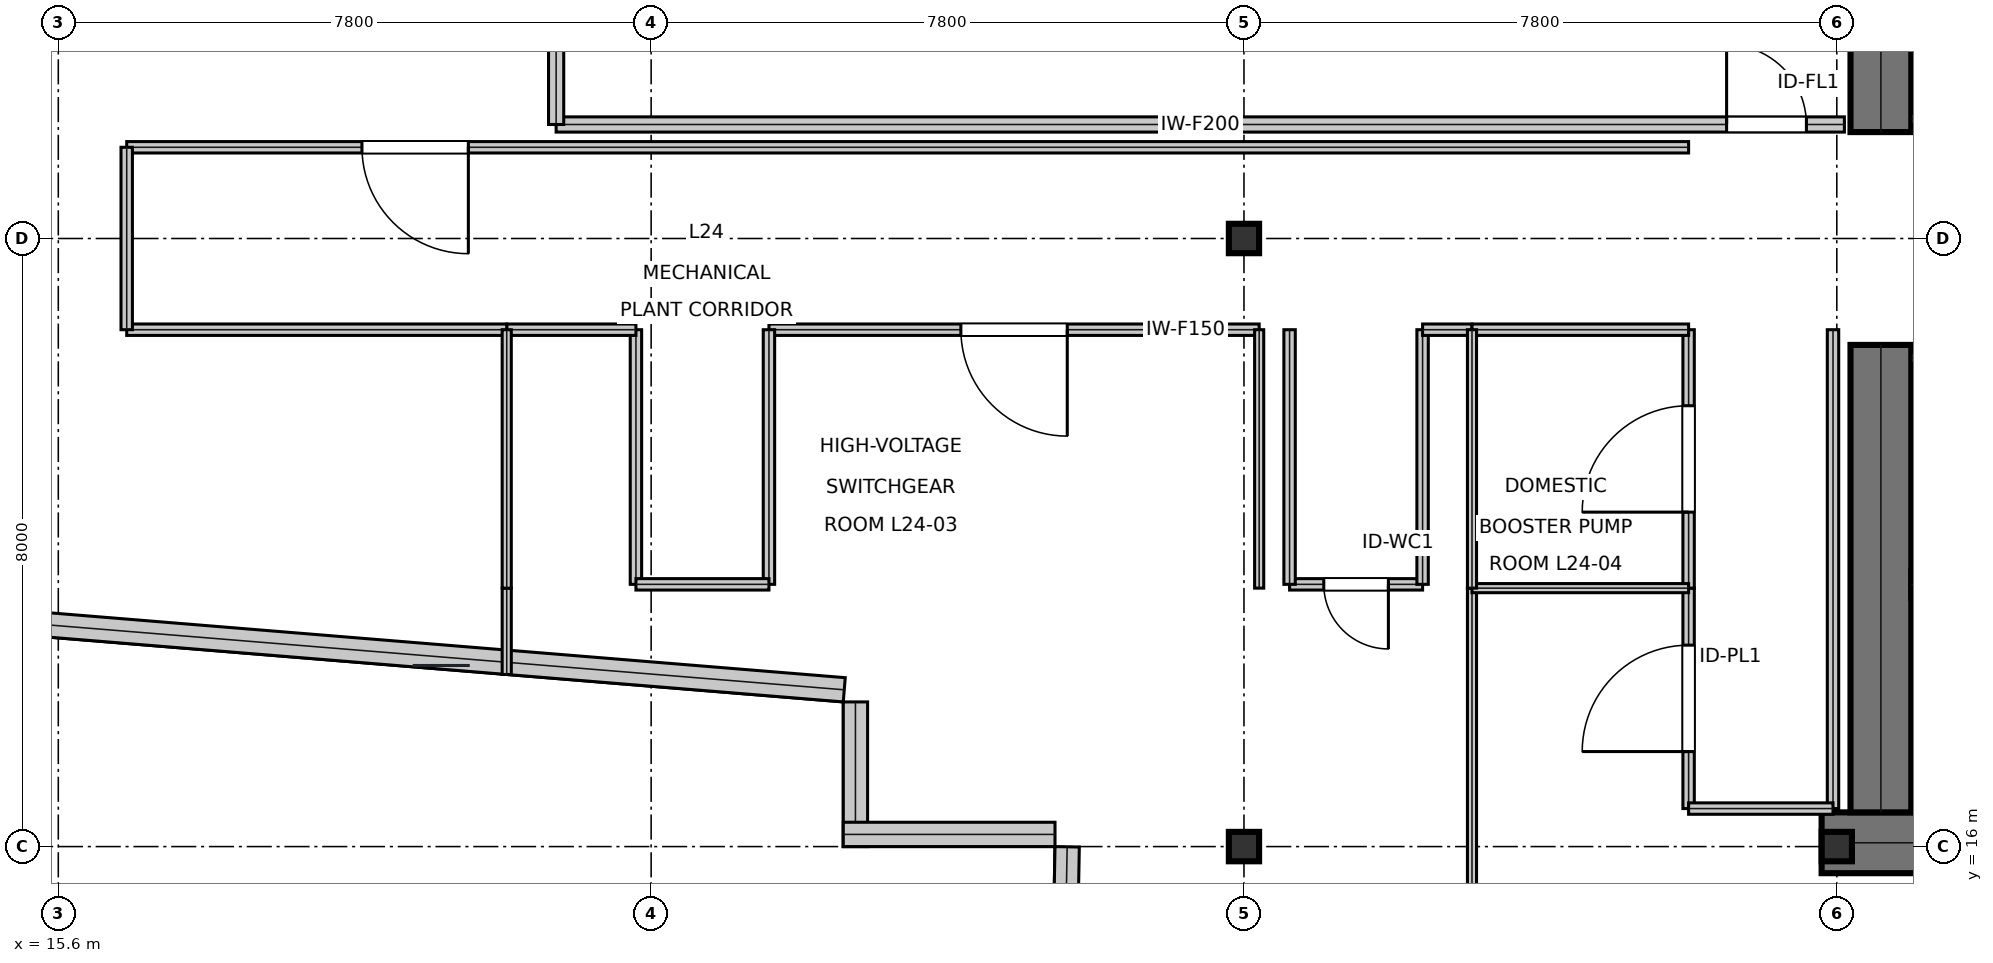
"""IFC4 building model, lengths in metres.
Left out: names, types, materials, properties, quantities, classifications, styles, units other than length and angle.
Written with IfcOpenShell. Run it as: python <this file> out.ifc"""

import sys

from ifc_helpers import new_model, si_unit, direction, frame, frame_2d, origin, origin_2d, place, context, subcontext, project, spatial, rectangle, i_section, extrude, element, fill, save


model = new_model("IFC4")
c1 = context("Model", 3, precision=1e-05, world=origin(), true_north=direction((0.0, 1.0)))
c2 = subcontext(c1, "Body", "Model", "MODEL_VIEW")
j1 = project(units=[si_unit("LENGTHUNIT", "METRE"), si_unit("PLANEANGLEUNIT", "RADIAN")], contexts=[c1])
p1 = place(None, origin())
s1 = spatial("IfcSite", under=j1, at=p1, CompositionType="ELEMENT")
p2 = place(p1, origin())
s2 = spatial("IfcBuilding", under=s1, at=p2, CompositionType="ELEMENT")
p3 = place(p2, frame((0.0, 0.0, 106.65)))
s3 = spatial("IfcBuildingStorey", under=s2, at=p3, CompositionType="ELEMENT", Elevation=106.65)
p4 = place(p3, frame((38.8, 16.05, 0.0), z_axis=(0.0, 0.0, 1.0), x_axis=(1.0, 0.0, 0.0)))
e1 = element("IfcWall", 1, at=p4, inside=s3, PredefinedType="SHEAR", context=c2, shape_type="SweptSolid", body=[
    extrude(rectangle(XDim=16.0, YDim=0.8, at=frame_2d((8.0, 0.0))), origin(), (0.0, 0.0, 1.0), 5.12),
])
p5 = place(p3, frame((39.58, 16.45, 0.0), z_axis=(0.0, 0.0, 1.0), x_axis=(0.0, 1.0, 0.0)))
e2 = element("IfcWall", 2, at=p5, inside=s3, PredefinedType="SHEAR", context=c2, shape_type="SweptSolid", body=[
    extrude(rectangle(XDim=6.15, YDim=0.8, at=frame_2d((3.075, 0.0))), origin(), (0.0, 0.0, 1.0), 5.12),
])
p6 = place(p3, frame((39.58, 25.4, 0.0), z_axis=(0.0, 0.0, 1.0), x_axis=(0.0, 1.0, 0.0)))
e3 = element("IfcWall", 3, at=p6, inside=s3, PredefinedType="SHEAR", context=c2, shape_type="SweptSolid", body=[
    extrude(rectangle(XDim=6.15, YDim=0.8, at=frame_2d((3.075, 0.0))), origin(), (0.0, 0.0, 1.0), 5.12),
])
p7 = place(p6, frame((1.35, 0.0, 0.0)))
e4 = element("IfcOpeningElement", 4, at=p7, cuts=e3, PredefinedType="OPENING", context=c2, shape_type="SweptSolid", body=[
    extrude(rectangle(XDim=1.05, YDim=2.15, at=frame_2d((0.525, 1.075))), frame((0.0, 0.41, 0.0), z_axis=(0.0, -1.0, 0.0), x_axis=(1.0, 0.0, 0.0)), (0.0, 0.0, 1.0), 0.82),
])
p8 = place(p3, frame((39.98, 19.445, 0.0), z_axis=(0.0, 0.0, 1.0), x_axis=(1.0, 0.0, 0.0)))
e5 = element("IfcWall", 5, at=p8, inside=s3, PredefinedType="SHEAR", context=c2, shape_type="SweptSolid", body=[
    extrude(rectangle(XDim=7.71, YDim=0.35, at=frame_2d((3.855, 0.0))), origin(), (0.0, 0.0, 1.0), 5.12),
])
p9 = place(p8, frame((0.25, 0.0, 0.0)))
e6 = element("IfcOpeningElement", 6, at=p9, cuts=e5, PredefinedType="OPENING", context=c2, shape_type="SweptSolid", body=[
    extrude(rectangle(XDim=1.1, YDim=2.15, at=frame_2d((0.55, 1.075))), frame((0.0, 0.185, 0.0), z_axis=(0.0, -1.0, 0.0), x_axis=(1.0, 0.0, 0.0)), (0.0, 0.0, 1.0), 0.37),
])
for number, where, z_axis, x_axis in (
    (7, (31.2, 16.0, 0.0), (0.0, 0.0, 1.0), (1.0, 0.0, 0.0)),
    (8, (31.2, 24.0, 0.0), (0.0, 0.0, 1.0), (1.0, 0.0, 0.0)),
    (9, (39.0, 16.0, 0.0), (0.0, 0.0, 1.0), (1.0, 0.0, 0.0)),
):
    element("IfcColumn", number, at=place(p3, frame(where, z_axis=z_axis, x_axis=x_axis)), inside=s3, PredefinedType="COLUMN", context=c2, shape_type="SweptSolid", body=[
        extrude(i_section(OverallWidth=0.398, OverallDepth=0.387, WebThickness=0.021, FlangeThickness=0.033, at=origin_2d()), origin(), (0.0, 0.0, 1.0), 5.394),
    ])
p10 = place(p3, frame((9.513, 19.402, 0.0), z_axis=(0.0, 0.0, 1.0), x_axis=(0.996692994059, -0.081259310815, 0.0)))
e10 = element("IfcWall", 10, at=p10, inside=s3, PredefinedType="STANDARD", context=c2, shape_type="SweptSolid", body=[
    extrude(rectangle(XDim=16.482, YDim=0.32, at=frame_2d((8.241, 0.0))), origin(), (0.0, 0.0, 1.0), 4.648),
])
p11 = place(p3, frame((26.088, 17.903, 0.0), z_axis=(0.0, 0.0, 1.0), x_axis=(0.0, -1.0, 0.0)))
e11 = element("IfcWall", 11, at=p11, inside=s3, PredefinedType="STANDARD", context=c2, shape_type="SweptSolid", body=[
    extrude(rectangle(XDim=1.903, YDim=0.32, at=frame_2d((0.952, 0.0))), origin(), (0.0, 0.0, 1.0), 4.648),
])
p12 = place(p3, frame((25.928, 16.16, 0.0), z_axis=(0.0, 0.0, 1.0), x_axis=(1.0, 0.0, 0.0)))
e12 = element("IfcWall", 12, at=p12, inside=s3, PredefinedType="STANDARD", context=c2, shape_type="SweptSolid", body=[
    extrude(rectangle(XDim=2.786, YDim=0.32, at=frame_2d((1.393, 0.0))), origin(), (0.0, 0.0, 1.0), 5.12),
])
p13 = place(p3, frame((28.874, 15.997, 0.0), z_axis=(0.0, 0.0, 1.0), x_axis=(-0.017987206329, -0.999838217117, 0.0)))
e13 = element("IfcWall", 13, at=p13, inside=s3, PredefinedType="STANDARD", context=c2, shape_type="SweptSolid", body=[
    extrude(rectangle(XDim=10.723, YDim=0.32, at=frame_2d((5.361, 0.0))), origin(), (0.0, 0.0, 1.0), 5.12),
])
p14 = place(p3, frame((39.98, 25.575, 0.0), z_axis=(0.0, 0.0, 1.0), x_axis=(1.0, 0.0, 0.0)))
e14 = element("IfcWall", 14, at=p14, inside=s3, PredefinedType="PARTITIONING", context=c2, shape_type="SweptSolid", body=[
    extrude(rectangle(XDim=5.9, YDim=0.15, at=frame_2d((2.95, 0.0))), origin(), (0.0, 0.0, 1.0), 5.12),
])
p15 = place(p14, frame((2.35, 0.0, 0.0)))
e15 = element("IfcOpeningElement", 15, at=p15, cuts=e14, PredefinedType="OPENING", context=c2, shape_type="SweptSolid", body=[
    extrude(rectangle(XDim=1.05, YDim=2.15, at=frame_2d((0.525, 1.075))), frame((0.0, 0.085, 0.0), z_axis=(0.0, -1.0, 0.0), x_axis=(1.0, 0.0, 0.0)), (0.0, 0.0, 1.0), 0.17),
])
p16 = place(p3, frame((39.98, 22.425, 0.0), z_axis=(0.0, 0.0, 1.0), x_axis=(1.0, 0.0, 0.0)))
e16 = element("IfcWall", 16, at=p16, inside=s3, PredefinedType="PARTITIONING", context=c2, shape_type="SweptSolid", body=[
    extrude(rectangle(XDim=5.9, YDim=0.15, at=frame_2d((2.95, 0.0))), origin(), (0.0, 0.0, 1.0), 5.12),
])
p17 = place(p16, frame((2.35, 0.0, 0.0)))
e17 = element("IfcOpeningElement", 17, at=p17, cuts=e16, PredefinedType="OPENING", context=c2, shape_type="SweptSolid", body=[
    extrude(rectangle(XDim=1.05, YDim=2.15, at=frame_2d((0.525, 1.075))), frame((0.0, 0.085, 0.0), z_axis=(0.0, -1.0, 0.0), x_axis=(1.0, 0.0, 0.0)), (0.0, 0.0, 1.0), 0.17),
])
p18 = place(p3, frame((22.15, 25.5, 0.0), z_axis=(0.0, 0.0, 1.0), x_axis=(1.0, 0.0, 0.0)))
e18 = element("IfcWall", 18, at=p18, inside=s3, PredefinedType="SOLIDWALL", context=c2, shape_type="SweptSolid", body=[
    extrude(rectangle(XDim=16.95, YDim=0.2, at=frame_2d((8.475, 0.0))), origin(), (0.0, 0.0, 1.0), 4.5),
])
p19 = place(p18, frame((15.4, 0.0, 0.0)))
e19 = element("IfcOpeningElement", 19, at=p19, cuts=e18, PredefinedType="OPENING", context=c2, shape_type="SweptSolid", body=[
    extrude(rectangle(XDim=1.05, YDim=2.15, at=frame_2d((0.525, 1.075))), frame((0.0, 0.11, 0.0), z_axis=(0.0, -1.0, 0.0), x_axis=(1.0, 0.0, 0.0)), (0.0, 0.0, 1.0), 0.22),
])
p20 = place(p3, frame((22.15, 25.5, 0.0), z_axis=(0.0, 0.0, 1.0), x_axis=(0.0, 1.0, 0.0)))
e20 = element("IfcWall", 20, at=p20, inside=s3, PredefinedType="SOLIDWALL", context=c2, shape_type="SweptSolid", body=[
    extrude(rectangle(XDim=4.149, YDim=0.2, at=frame_2d((2.074, 0.0))), origin(), (0.0, 0.0, 1.0), 5.12),
])
p21 = place(p3, frame((37.05, 16.5, 0.0), z_axis=(0.0, 0.0, 1.0), x_axis=(0.0, 1.0, 0.0)))
e21 = element("IfcWall", 21, at=p21, inside=s3, PredefinedType="PARTITIONING", context=c2, shape_type="SweptSolid", body=[
    extrude(rectangle(XDim=2.9, YDim=0.15, at=frame_2d((1.45, 0.0))), origin(), (0.0, 0.0, 1.0), 4.753),
])
p22 = place(p21, frame((0.75, 0.0, 0.0)))
e22 = element("IfcOpeningElement", 22, at=p22, cuts=e21, PredefinedType="OPENING", context=c2, shape_type="SweptSolid", body=[
    extrude(rectangle(XDim=1.4, YDim=2.2, at=frame_2d((0.7, 1.1))), frame((0.0, 0.085, 0.0), z_axis=(0.0, -1.0, 0.0), x_axis=(1.0, 0.0, 0.0)), (0.0, 0.0, 1.0), 0.17),
])
p23 = place(p3, frame((31.8, 19.45, 0.0), z_axis=(0.0, 0.0, 1.0), x_axis=(1.0, 0.0, 0.0)))
e23 = element("IfcWall", 23, at=p23, inside=s3, PredefinedType="PARTITIONING", context=c2, shape_type="SweptSolid", body=[
    extrude(rectangle(XDim=1.75, YDim=0.15, at=frame_2d((0.875, 0.0))), origin(), (0.0, 0.0, 1.0), 5.12),
])
p24 = place(p23, frame((0.45, 0.0, 0.0)))
e24 = element("IfcOpeningElement", 24, at=p24, cuts=e23, PredefinedType="OPENING", context=c2, shape_type="SweptSolid", body=[
    extrude(rectangle(XDim=0.85, YDim=2.15, at=frame_2d((0.425, 1.075))), frame((0.0, 0.085, 0.0), z_axis=(0.0, -1.0, 0.0), x_axis=(1.0, 0.0, 0.0)), (0.0, 0.0, 1.0), 0.17),
])
p25 = place(p3, frame((24.95, 22.8, 0.0), z_axis=(0.0, 0.0, 1.0), x_axis=(1.0, 0.0, 0.0)))
e25 = element("IfcWall", 25, at=p25, inside=s3, PredefinedType="PARTITIONING", context=c2, shape_type="SweptSolid", body=[
    extrude(rectangle(XDim=6.45, YDim=0.15, at=frame_2d((3.225, 0.0))), origin(), (0.0, 0.0, 1.0), 4.5),
])
p26 = place(p25, frame((2.525, 0.0, 0.0)))
e26 = element("IfcOpeningElement", 26, at=p26, cuts=e25, PredefinedType="OPENING", context=c2, shape_type="SweptSolid", body=[
    extrude(rectangle(XDim=1.4, YDim=2.2, at=frame_2d((0.7, 1.1))), frame((0.0, 0.085, 0.0), z_axis=(0.0, -1.0, 0.0), x_axis=(1.0, 0.0, 0.0)), (0.0, 0.0, 1.0), 0.17),
])
p27 = place(p3, frame((37.05, 19.4, 0.0), z_axis=(0.0, 0.0, 1.0), x_axis=(0.0, 1.0, 0.0)))
e27 = element("IfcWall", 27, at=p27, inside=s3, PredefinedType="PARTITIONING", context=c2, shape_type="SweptSolid", body=[
    extrude(rectangle(XDim=3.4, YDim=0.15, at=frame_2d((1.7, 0.0))), origin(), (0.0, 0.0, 1.0), 4.753),
])
p28 = place(p27, frame((1.0, 0.0, 0.0)))
e28 = element("IfcOpeningElement", 28, at=p28, cuts=e27, PredefinedType="OPENING", context=c2, shape_type="SweptSolid", body=[
    extrude(rectangle(XDim=1.4, YDim=2.2, at=frame_2d((0.7, 1.1))), frame((0.0, 0.085, 0.0), z_axis=(0.0, -1.0, 0.0), x_axis=(1.0, 0.0, 0.0)), (0.0, 0.0, 1.0), 0.17),
])
p29 = place(p3, frame((16.5, 25.2, 0.0), z_axis=(0.0, 0.0, 1.0), x_axis=(1.0, 0.0, 0.0)))
e29 = element("IfcWall", 29, at=p29, inside=s3, PredefinedType="PARTITIONING", context=c2, shape_type="SweptSolid", body=[
    extrude(rectangle(XDim=20.55, YDim=0.15, at=frame_2d((10.275, 0.0))), origin(), (0.0, 0.0, 1.0), 4.5),
])
p30 = place(p29, frame((3.095, 0.0, 0.0)))
e30 = element("IfcOpeningElement", 30, at=p30, cuts=e29, PredefinedType="OPENING", context=c2, shape_type="SweptSolid", body=[
    extrude(rectangle(XDim=1.4, YDim=2.2, at=frame_2d((0.7, 1.1))), frame((0.0, 0.085, 0.0), z_axis=(0.0, -1.0, 0.0), x_axis=(1.0, 0.0, 0.0)), (0.0, 0.0, 1.0), 0.17),
])
p31 = place(p3, frame((38.95, 16.5, 0.0), z_axis=(0.0, 0.0, 1.0), x_axis=(0.0, 1.0, 0.0)))
e31 = element("IfcWall", 31, at=p31, inside=s3, PredefinedType="PARTITIONING", context=c2, shape_type="SweptSolid", body=[
    extrude(rectangle(XDim=6.3, YDim=0.15, at=frame_2d((3.15, 0.0))), origin(), (0.0, 0.0, 1.0), 4.753),
])
p32 = place(p3, frame((37.05, 16.5, 0.0), z_axis=(0.0, 0.0, 1.0), x_axis=(1.0, 0.0, 0.0)))
e32 = element("IfcWall", 32, at=p32, inside=s3, PredefinedType="PARTITIONING", context=c2, shape_type="SweptSolid", body=[
    extrude(rectangle(XDim=1.9, YDim=0.15, at=frame_2d((0.95, 0.0))), origin(), (0.0, 0.0, 1.0), 5.12),
])
for number, where, z_axis, x_axis in (
    (33, (33.55, 19.45, 0.0), (0.0, 0.0, 1.0), (0.0, 1.0, 0.0)),
    (34, (31.8, 19.45, 0.0), (0.0, 0.0, 1.0), (0.0, 1.0, 0.0)),
):
    element("IfcWall", number, at=place(p3, frame(where, z_axis=z_axis, x_axis=x_axis)), inside=s3, PredefinedType="PARTITIONING", context=c2, shape_type="SweptSolid", body=[
        extrude(rectangle(XDim=3.35, YDim=0.15, at=frame_2d((1.675, 0.0))), origin(), (0.0, 0.0, 1.0), 4.753),
    ])
p33 = place(p3, frame((33.55, 22.8, 0.0), z_axis=(0.0, 0.0, 1.0), x_axis=(1.0, 0.0, 0.0)))
e35 = element("IfcWall", 35, at=p33, inside=s3, PredefinedType="PARTITIONING", context=c2, shape_type="SweptSolid", body=[
    extrude(rectangle(XDim=0.65, YDim=0.15, at=frame_2d((0.325, 0.0))), origin(), (0.0, 0.0, 1.0), 5.12),
])
p34 = place(p3, frame((24.95, 19.45, 0.0), z_axis=(0.0, 0.0, 1.0), x_axis=(0.0, 1.0, 0.0)))
e36 = element("IfcWall", 36, at=p34, inside=s3, PredefinedType="PARTITIONING", context=c2, shape_type="SweptSolid", body=[
    extrude(rectangle(XDim=3.35, YDim=0.15, at=frame_2d((1.675, 0.0))), origin(), (0.0, 0.0, 1.0), 5.12),
])
p35 = place(p3, frame((23.2, 19.45, 0.0), z_axis=(0.0, 0.0, 1.0), x_axis=(0.0, 1.0, 0.0)))
e37 = element("IfcWall", 37, at=p35, inside=s3, PredefinedType="PARTITIONING", context=c2, shape_type="SweptSolid", body=[
    extrude(rectangle(XDim=3.35, YDim=0.15, at=frame_2d((1.675, 0.0))), origin(), (0.0, 0.0, 1.0), 4.5),
])
p36 = place(p3, frame((23.2, 19.45, 0.0), z_axis=(0.0, 0.0, 1.0), x_axis=(1.0, 0.0, 0.0)))
e38 = element("IfcWall", 38, at=p36, inside=s3, PredefinedType="PARTITIONING", context=c2, shape_type="SweptSolid", body=[
    extrude(rectangle(XDim=1.75, YDim=0.15, at=frame_2d((0.875, 0.0))), origin(), (0.0, 0.0, 1.0), 5.12),
])
p37 = place(p3, frame((21.5, 22.8, 0.0), z_axis=(0.0, 0.0, 1.0), x_axis=(1.0, 0.0, 0.0)))
e39 = element("IfcWall", 39, at=p37, inside=s3, PredefinedType="PARTITIONING", context=c2, shape_type="SweptSolid", body=[
    extrude(rectangle(XDim=1.7, YDim=0.15, at=frame_2d((0.85, 0.0))), origin(), (0.0, 0.0, 1.0), 4.5),
])
p38 = place(p3, frame((34.2, 22.8, 0.0), z_axis=(0.0, 0.0, 1.0), x_axis=(1.0, 0.0, 0.0)))
e40 = element("IfcWall", 40, at=p38, inside=s3, PredefinedType="PARTITIONING", context=c2, shape_type="SweptSolid", body=[
    extrude(rectangle(XDim=2.85, YDim=0.15, at=frame_2d((1.425, 0.0))), origin(), (0.0, 0.0, 1.0), 5.12),
])
p39 = place(p3, frame((16.5, 22.8, 0.0), z_axis=(0.0, 0.0, 1.0), x_axis=(1.0, 0.0, 0.0)))
e41 = element("IfcWall", 41, at=p39, inside=s3, PredefinedType="PARTITIONING", context=c2, shape_type="SweptSolid", body=[
    extrude(rectangle(XDim=5.0, YDim=0.15, at=frame_2d((2.5, 0.0))), origin(), (0.0, 0.0, 1.0), 4.753),
])
p40 = place(p3, frame((16.5, 22.8, 0.0), z_axis=(0.0, 0.0, 1.0), x_axis=(0.0, 1.0, 0.0)))
e42 = element("IfcWall", 42, at=p40, inside=s3, PredefinedType="PARTITIONING", context=c2, shape_type="SweptSolid", body=[
    extrude(rectangle(XDim=2.4, YDim=0.15, at=frame_2d((1.2, 0.0))), origin(), (0.0, 0.0, 1.0), 5.12),
])
p41 = place(p3, frame((34.2, 3.822, 0.0), z_axis=(0.0, 0.0, 1.0), x_axis=(0.0, 1.0, 0.0)))
e43 = element("IfcWall", 43, at=p41, inside=s3, PredefinedType="PARTITIONING", context=c2, shape_type="SweptSolid", body=[
    extrude(rectangle(XDim=15.578, YDim=0.12, at=frame_2d((7.789, 0.0))), origin(), (0.0, 0.0, 1.0), 4.5),
])
p42 = place(p3, frame((34.2, 19.4, 0.0), z_axis=(0.0, 0.0, 1.0), x_axis=(1.0, 0.0, 0.0)))
e44 = element("IfcWall", 44, at=p42, inside=s3, PredefinedType="PARTITIONING", context=c2, shape_type="SweptSolid", body=[
    extrude(rectangle(XDim=2.85, YDim=0.12, at=frame_2d((1.425, 0.0))), origin(), (0.0, 0.0, 1.0), 5.12),
])
p43 = place(p3, frame((31.4, 19.4, 0.0), z_axis=(0.0, 0.0, 1.0), x_axis=(0.0, 1.0, 0.0)))
e45 = element("IfcWall", 45, at=p43, inside=s3, PredefinedType="PARTITIONING", context=c2, shape_type="SweptSolid", body=[
    extrude(rectangle(XDim=3.4, YDim=0.12, at=frame_2d((1.7, 0.0))), origin(), (0.0, 0.0, 1.0), 4.5),
])
p44 = place(p3, frame((34.2, 19.4, 0.0), z_axis=(0.0, 0.0, 1.0), x_axis=(0.0, 1.0, 0.0)))
e46 = element("IfcWall", 46, at=p44, inside=s3, PredefinedType="PARTITIONING", context=c2, shape_type="SweptSolid", body=[
    extrude(rectangle(XDim=3.4, YDim=0.12, at=frame_2d((1.7, 0.0))), origin(), (0.0, 0.0, 1.0), 4.753),
])
p45 = place(p3, frame((21.5, 18.264, 0.0), z_axis=(0.0, 0.0, 1.0), x_axis=(0.0, 1.0, 0.0)))
e47 = element("IfcWall", 47, at=p45, inside=s3, PredefinedType="PARTITIONING", context=c2, shape_type="SweptSolid", body=[
    extrude(rectangle(XDim=1.136, YDim=0.12, at=frame_2d((0.568, 0.0))), origin(), (0.0, 0.0, 1.0), 5.12),
])
p46 = place(p3, frame((21.5, 19.4, 0.0), z_axis=(0.0, 0.0, 1.0), x_axis=(0.0, 1.0, 0.0)))
e48 = element("IfcWall", 48, at=p46, inside=s3, PredefinedType="PARTITIONING", context=c2, shape_type="SweptSolid", body=[
    extrude(rectangle(XDim=3.4, YDim=0.12, at=frame_2d((1.7, 0.0))), origin(), (0.0, 0.0, 1.0), 4.5),
])
p47 = place(p19, origin())
e49 = element("IfcDoor", 49, at=p47, inside=s3, OperationType="SINGLE_SWING_LEFT", PredefinedType="DOOR", context=c2, shape_type="SweptSolid", body=[
    extrude(rectangle(XDim=1.05, YDim=2.15, at=frame_2d((0.525, 1.075))), frame((0.0, 0.025, 0.0), z_axis=(0.0, -1.0, 0.0), x_axis=(1.0, 0.0, 0.0)), (0.0, 0.0, 1.0), 0.05),
])
fill(e19, e49)
p48 = place(p22, origin())
e50 = element("IfcDoor", 50, at=p48, inside=s3, OperationType="SINGLE_SWING_LEFT", PredefinedType="DOOR", context=c2, shape_type="SweptSolid", body=[
    extrude(rectangle(XDim=1.4, YDim=2.2, at=frame_2d((0.7, 1.1))), frame((0.0, 0.025, 0.0), z_axis=(0.0, -1.0, 0.0), x_axis=(1.0, 0.0, 0.0)), (0.0, 0.0, 1.0), 0.05),
])
fill(e22, e50)
p49 = place(p24, frame((0.85, 0.0, 0.0), z_axis=(0.0, 0.0, 1.0), x_axis=(-1.0, 0.0, 0.0)))
e51 = element("IfcDoor", 51, at=p49, inside=s3, OperationType="SINGLE_SWING_LEFT", PredefinedType="DOOR", context=c2, shape_type="SweptSolid", body=[
    extrude(rectangle(XDim=0.85, YDim=2.15, at=frame_2d((0.425, 1.075))), frame((0.0, 0.025, 0.0), z_axis=(0.0, -1.0, 0.0), x_axis=(1.0, 0.0, 0.0)), (0.0, 0.0, 1.0), 0.05),
])
fill(e24, e51)
p50 = place(p26, frame((1.4, 0.0, 0.0), z_axis=(0.0, 0.0, 1.0), x_axis=(-1.0, 0.0, 0.0)))
e52 = element("IfcDoor", 52, at=p50, inside=s3, OperationType="SINGLE_SWING_LEFT", PredefinedType="DOOR", context=c2, shape_type="SweptSolid", body=[
    extrude(rectangle(XDim=1.4, YDim=2.2, at=frame_2d((0.7, 1.1))), frame((0.0, 0.025, 0.0), z_axis=(0.0, -1.0, 0.0), x_axis=(1.0, 0.0, 0.0)), (0.0, 0.0, 1.0), 0.05),
])
fill(e26, e52)
p51 = place(p28, origin())
e53 = element("IfcDoor", 53, at=p51, inside=s3, OperationType="SINGLE_SWING_LEFT", PredefinedType="DOOR", context=c2, shape_type="SweptSolid", body=[
    extrude(rectangle(XDim=1.4, YDim=2.2, at=frame_2d((0.7, 1.1))), frame((0.0, 0.025, 0.0), z_axis=(0.0, -1.0, 0.0), x_axis=(1.0, 0.0, 0.0)), (0.0, 0.0, 1.0), 0.05),
])
fill(e28, e53)
p52 = place(p30, frame((1.4, 0.0, 0.0), z_axis=(0.0, 0.0, 1.0), x_axis=(-1.0, 0.0, 0.0)))
e54 = element("IfcDoor", 54, at=p52, inside=s3, OperationType="SINGLE_SWING_LEFT", PredefinedType="DOOR", context=c2, shape_type="SweptSolid", body=[
    extrude(rectangle(XDim=1.4, YDim=2.2, at=frame_2d((0.7, 1.1))), frame((0.0, 0.025, 0.0), z_axis=(0.0, -1.0, 0.0), x_axis=(1.0, 0.0, 0.0)), (0.0, 0.0, 1.0), 0.05),
])
fill(e30, e54)
save(model, sys.argv[1])
